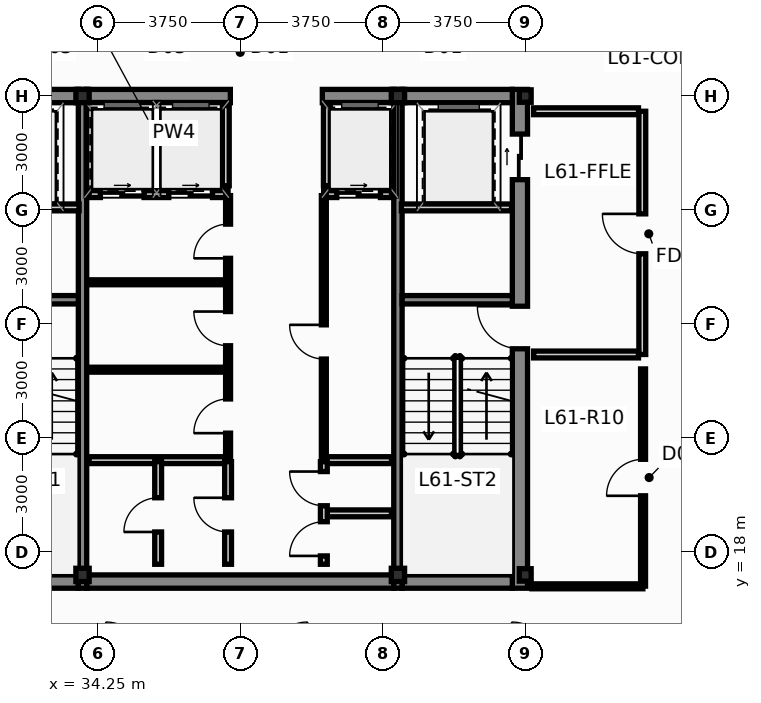
"""IFC4 building model, lengths in metres.
Left out: names, types, materials, properties, quantities, classifications, styles, units other than length and angle.
Written with IfcOpenShell. Run it as: python <this file> out.ifc"""

import sys

from ifc_helpers import new_model, si_unit, direction, frame, frame_2d, origin, origin_2d, place, context, subcontext, project, spatial, rectangle, hollow_rectangle, i_section, extrude, source, transform, mapped, element, fill, save


model = new_model("IFC4")
c1 = context("Model", 3, precision=1e-05, world=origin(), true_north=direction((0.0, 1.0)))
c2 = subcontext(c1, "Body", "Model", "MODEL_VIEW")
j1 = project(units=[si_unit("LENGTHUNIT", "METRE"), si_unit("PLANEANGLEUNIT", "RADIAN")], contexts=[c1])
p1 = place(None, origin())
s1 = spatial("IfcSite", under=j1, at=p1, CompositionType="ELEMENT")
p2 = place(p1, origin())
s2 = spatial("IfcBuilding", under=s1, at=p2, CompositionType="ELEMENT")
p3 = place(p2, frame((0.0, 0.0, 233.5)))
s3 = spatial("IfcBuildingStorey", under=s2, at=p3, CompositionType="ELEMENT", Elevation=233.5)
m1 = source(origin(), c2, "Body", "SweptSolid", [
    extrude(i_section(OverallWidth=0.311, OverallDepth=0.327, WebThickness=0.016, FlangeThickness=0.025, at=origin_2d()), origin(), (0.0, 0.0, 1.0), 3.65),
])
for number, where, z_axis, x_axis in (
    (1, (45.5, 17.4, 0.0), (0.0, 0.0, 1.0), (1.0, 0.0, 0.0)),
    (2, (45.5, 30.0, 0.0), (0.0, 0.0, 1.0), (1.0, 0.0, 0.0)),
):
    element("IfcColumn", number, at=place(p3, frame(where, z_axis=z_axis, x_axis=x_axis)), inside=s3, PredefinedType="COLUMN", context=c2, shape_type="MappedRepresentation", body=[
        mapped(m1, transform((0.0, 0.0, 0.0), scale=1.0)),
    ])
m2 = source(origin(), c2, "Body", "SweptSolid", [
    extrude(hollow_rectangle(XDim=0.35, YDim=0.35, WallThickness=0.016, at=origin_2d()), origin(), (0.0, 0.0, 1.0), 3.65),
])
for number, where, z_axis, x_axis in (
    (3, (33.85, 17.4, 0.0), (0.0, 0.0, 1.0), (1.0, 0.0, 0.0)),
    (4, (42.15, 17.4, 0.0), (0.0, 0.0, 1.0), (1.0, 0.0, 0.0)),
    (5, (33.85, 30.0, 0.0), (0.0, 0.0, 1.0), (1.0, 0.0, 0.0)),
    (6, (42.15, 30.0, 0.0), (0.0, 0.0, 1.0), (1.0, 0.0, 0.0)),
):
    element("IfcColumn", number, at=place(p3, frame(where, z_axis=z_axis, x_axis=x_axis)), inside=s3, PredefinedType="COLUMN", context=c2, shape_type="MappedRepresentation", body=[
        mapped(m2, transform((0.0, 0.0, 0.0), scale=1.0)),
    ])
p4 = place(p3, frame((45.36, 17.05, 0.0), z_axis=(0.0, 0.0, 1.0), x_axis=(0.0, 1.0, 0.0)))
e7 = element("IfcWall", 7, at=p4, inside=s3, PredefinedType="SHEAR", context=c2, shape_type="SweptSolid", body=[
    extrude(rectangle(XDim=13.125, YDim=0.4, at=frame_2d((6.562, 0.0))), origin(), (0.0, 0.0, 1.0), 3.65),
])
p5 = place(p4, frame((6.3, 0.0, 0.0)))
e8 = element("IfcOpeningElement", 8, at=p5, cuts=e7, PredefinedType="OPENING", context=c2, shape_type="SweptSolid", body=[
    extrude(rectangle(XDim=1.12, YDim=2.15, at=frame_2d((0.56, 1.075))), frame((0.0, 0.212, 0.0), z_axis=(0.0, -1.0, 0.0), x_axis=(1.0, 0.0, 0.0)), (0.0, 0.0, 1.0), 0.424),
])
p6 = place(p4, frame((10.75, 0.0, 0.0)))
e9 = element("IfcOpeningElement", 9, at=p6, cuts=e7, PredefinedType="OPENING", context=c2, shape_type="SweptSolid", body=[
    extrude(rectangle(XDim=1.2, YDim=2.2, at=frame_2d((0.6, 1.1))), frame((0.0, 0.212, 0.0), z_axis=(0.0, -1.0, 0.0), x_axis=(1.0, 0.0, 0.0)), (0.0, 0.0, 1.0), 0.424),
])
p7 = place(p3, frame((30.84, 17.225, 0.0), z_axis=(0.0, 0.0, 1.0), x_axis=(1.0, 0.0, 0.0)))
e10 = element("IfcWall", 10, at=p7, inside=s3, PredefinedType="SHEAR", context=c2, shape_type="SweptSolid", body=[
    extrude(rectangle(XDim=2.9, YDim=0.35, at=frame_2d((1.45, 0.0))), origin(), (0.0, 0.0, 1.0), 3.65),
])
p8 = place(p3, frame((33.96, 17.225, 0.0), z_axis=(0.0, 0.0, 1.0), x_axis=(1.0, 0.0, 0.0)))
e11 = element("IfcWall", 11, at=p8, inside=s3, PredefinedType="SHEAR", context=c2, shape_type="SweptSolid", body=[
    extrude(rectangle(XDim=8.08, YDim=0.35, at=frame_2d((4.04, 0.0))), origin(), (0.0, 0.0, 1.0), 3.65),
])
for number, where, z_axis, x_axis in (
    (12, (42.26, 17.225, 0.0), (0.0, 0.0, 1.0), (1.0, 0.0, 0.0)),
    (13, (30.84, 30.0, 0.0), (0.0, 0.0, 1.0), (1.0, 0.0, 0.0)),
):
    element("IfcWall", number, at=place(p3, frame(where, z_axis=z_axis, x_axis=x_axis)), inside=s3, PredefinedType="SHEAR", context=c2, shape_type="SweptSolid", body=[
        extrude(rectangle(XDim=2.9, YDim=0.35, at=frame_2d((1.45, 0.0))), origin(), (0.0, 0.0, 1.0), 3.65),
    ])
p9 = place(p3, frame((33.96, 30.0, 0.0), z_axis=(0.0, 0.0, 1.0), x_axis=(1.0, 0.0, 0.0)))
e14 = element("IfcWall", 14, at=p9, inside=s3, PredefinedType="SHEAR", context=c2, shape_type="SweptSolid", body=[
    extrude(rectangle(XDim=3.78, YDim=0.35, at=frame_2d((1.89, 0.0))), origin(), (0.0, 0.0, 1.0), 3.65),
])
p10 = place(p3, frame((40.16, 30.0, 0.0), z_axis=(0.0, 0.0, 1.0), x_axis=(1.0, 0.0, 0.0)))
e15 = element("IfcWall", 15, at=p10, inside=s3, PredefinedType="SHEAR", context=c2, shape_type="SweptSolid", body=[
    extrude(rectangle(XDim=1.88, YDim=0.35, at=frame_2d((0.94, 0.0))), origin(), (0.0, 0.0, 1.0), 3.65),
])
p11 = place(p3, frame((42.26, 30.0, 0.0), z_axis=(0.0, 0.0, 1.0), x_axis=(1.0, 0.0, 0.0)))
e16 = element("IfcWall", 16, at=p11, inside=s3, PredefinedType="SHEAR", context=c2, shape_type="SweptSolid", body=[
    extrude(rectangle(XDim=2.9, YDim=0.35, at=frame_2d((1.45, 0.0))), origin(), (0.0, 0.0, 1.0), 3.65),
])
for number, where, z_axis, x_axis in (
    (17, (33.85, 17.05, 0.0), (0.0, 0.0, 1.0), (0.0, 1.0, 0.0)),
    (18, (42.15, 17.05, 0.0), (0.0, 0.0, 1.0), (0.0, 1.0, 0.0)),
):
    element("IfcWall", number, at=place(p3, frame(where, z_axis=z_axis, x_axis=x_axis)), inside=s3, PredefinedType="SHEAR", context=c2, shape_type="SweptSolid", body=[
        extrude(rectangle(XDim=13.125, YDim=0.22, at=frame_2d((6.562, 0.0))), origin(), (0.0, 0.0, 1.0), 3.65),
    ])
for number, where, z_axis, x_axis in (
    (19, (30.84, 24.64, 0.0), (0.0, 0.0, 1.0), (1.0, 0.0, 0.0)),
    (20, (42.26, 24.64, 0.0), (0.0, 0.0, 1.0), (1.0, 0.0, 0.0)),
):
    element("IfcWall", number, at=place(p3, frame(where, z_axis=z_axis, x_axis=x_axis)), inside=s3, PredefinedType="SHEAR", context=c2, shape_type="SweptSolid", body=[
        extrude(rectangle(XDim=2.9, YDim=0.22, at=frame_2d((1.45, 0.0))), origin(), (0.0, 0.0, 1.0), 3.65),
    ])
p12 = place(p3, frame((34.02, 27.42, 0.0), z_axis=(0.0, 0.0, 1.0), x_axis=(1.0, 0.0, 0.0)))
e21 = element("IfcWall", 21, at=p12, inside=s3, PredefinedType="PARTITIONING", context=c2, shape_type="SweptSolid", body=[
    extrude(rectangle(XDim=3.66, YDim=0.18, at=frame_2d((1.83, 0.0))), origin(), (0.0, 0.0, 1.0), 3.4),
])
p13 = place(p12, frame((0.3, 0.0, 0.0)))
e22 = element("IfcOpeningElement", 22, at=p13, cuts=e21, PredefinedType="OPENING", context=c2, shape_type="SweptSolid", body=[
    extrude(rectangle(XDim=1.15, YDim=2.2, at=frame_2d((0.575, 1.1))), frame((0.0, 0.102, 0.0), z_axis=(0.0, -1.0, 0.0), x_axis=(1.0, 0.0, 0.0)), (0.0, 0.0, 1.0), 0.204),
])
p14 = place(p12, frame((2.1, 0.0, 0.0)))
e23 = element("IfcOpeningElement", 23, at=p14, cuts=e21, PredefinedType="OPENING", context=c2, shape_type="SweptSolid", body=[
    extrude(rectangle(XDim=1.15, YDim=2.2, at=frame_2d((0.575, 1.1))), frame((0.0, 0.102, 0.0), z_axis=(0.0, -1.0, 0.0), x_axis=(1.0, 0.0, 0.0)), (0.0, 0.0, 1.0), 0.204),
])
p15 = place(p3, frame((40.22, 27.42, 0.0), z_axis=(0.0, 0.0, 1.0), x_axis=(1.0, 0.0, 0.0)))
e24 = element("IfcWall", 24, at=p15, inside=s3, PredefinedType="PARTITIONING", context=c2, shape_type="SweptSolid", body=[
    extrude(rectangle(XDim=1.76, YDim=0.18, at=frame_2d((0.88, 0.0))), origin(), (0.0, 0.0, 1.0), 3.4),
])
p16 = place(p15, frame((0.32, 0.0, 0.0)))
e25 = element("IfcOpeningElement", 25, at=p16, cuts=e24, PredefinedType="OPENING", context=c2, shape_type="SweptSolid", body=[
    extrude(rectangle(XDim=1.15, YDim=2.2, at=frame_2d((0.575, 1.1))), frame((0.0, 0.102, 0.0), z_axis=(0.0, -1.0, 0.0), x_axis=(1.0, 0.0, 0.0)), (0.0, 0.0, 1.0), 0.204),
])
for number, where, z_axis, x_axis in (
    (26, (37.62, 27.64, 0.0), (0.0, 0.0, 1.0), (0.0, 1.0, 0.0)),
    (27, (40.28, 27.64, 0.0), (0.0, 0.0, 1.0), (0.0, 1.0, 0.0)),
):
    element("IfcWall", number, at=place(p3, frame(where, z_axis=z_axis, x_axis=x_axis)), inside=s3, PredefinedType="PARTITIONING", context=c2, shape_type="SweptSolid", body=[
        extrude(rectangle(XDim=2.11, YDim=0.18, at=frame_2d((1.055, 0.0))), origin(), (0.0, 0.0, 1.0), 3.4),
    ])
p17 = place(p3, frame((48.58, 23.2, 0.0), z_axis=(0.0, 0.0, 1.0), x_axis=(0.0, 1.0, 0.0)))
e28 = element("IfcWall", 28, at=p17, inside=s3, PredefinedType="PARTITIONING", context=c2, shape_type="SweptSolid", body=[
    extrude(rectangle(XDim=6.4, YDim=0.18, at=frame_2d((3.2, 0.0))), origin(), (0.0, 0.0, 1.0), 3.085),
])
p18 = place(p17, frame((2.65, 0.0, 0.0)))
e29 = element("IfcOpeningElement", 29, at=p18, cuts=e28, PredefinedType="OPENING", context=c2, shape_type="SweptSolid", body=[
    extrude(rectangle(XDim=1.05, YDim=2.15, at=frame_2d((0.525, 1.075))), frame((0.0, 0.102, 0.0), z_axis=(0.0, -1.0, 0.0), x_axis=(1.0, 0.0, 0.0)), (0.0, 0.0, 1.0), 0.204),
])
p19 = place(p3, frame((45.72, 23.2, 0.0), z_axis=(0.0, 0.0, 1.0), x_axis=(1.0, 0.0, 0.0)))
e30 = element("IfcWall", 30, at=p19, inside=s3, PredefinedType="PARTITIONING", context=c2, shape_type="SweptSolid", body=[
    extrude(rectangle(XDim=2.76, YDim=0.18, at=frame_2d((1.38, 0.0))), origin(), (0.0, 0.0, 1.0), 3.4),
])
p20 = place(p3, frame((45.72, 29.6, 0.0), z_axis=(0.0, 0.0, 1.0), x_axis=(1.0, 0.0, 0.0)))
e31 = element("IfcWall", 31, at=p20, inside=s3, PredefinedType="PARTITIONING", context=c2, shape_type="SweptSolid", body=[
    extrude(rectangle(XDim=2.76, YDim=0.18, at=frame_2d((1.38, 0.0))), origin(), (0.0, 0.0, 1.0), 2.985),
])
for number, where, z_axis, x_axis in (
    (32, (30.86, 27.07, 0.0), (0.0, 0.0, 1.0), (1.0, 0.0, 0.0)),
    (33, (42.24, 27.07, 0.0), (0.0, 0.0, 1.0), (1.0, 0.0, 0.0)),
):
    element("IfcWall", number, at=place(p3, frame(where, z_axis=z_axis, x_axis=x_axis)), inside=s3, PredefinedType="PARTITIONING", context=c2, shape_type="SweptSolid", body=[
        extrude(rectangle(XDim=2.9, YDim=0.18, at=frame_2d((1.45, 0.0))), origin(), (0.0, 0.0, 1.0), 3.4),
    ])
p21 = place(p3, frame((34.02, 20.42, 0.0), z_axis=(0.0, 0.0, 1.0), x_axis=(1.0, 0.0, 0.0)))
e34 = element("IfcWall", 34, at=p21, inside=s3, PredefinedType="PARTITIONING", context=c2, shape_type="SweptSolid", body=[
    extrude(rectangle(XDim=3.64, YDim=0.18, at=frame_2d((1.82, 0.0))), origin(), (0.0, 0.0, 1.0), 3.4),
])
p22 = place(p3, frame((40.22, 20.42, 0.0), z_axis=(0.0, 0.0, 1.0), x_axis=(1.0, 0.0, 0.0)))
e35 = element("IfcWall", 35, at=p22, inside=s3, PredefinedType="PARTITIONING", context=c2, shape_type="SweptSolid", body=[
    extrude(rectangle(XDim=1.76, YDim=0.18, at=frame_2d((0.88, 0.0))), origin(), (0.0, 0.0, 1.0), 3.4),
])
for number, where, z_axis, x_axis in (
    (36, (34.02, 22.8, 0.0), (0.0, 0.0, 1.0), (1.0, 0.0, 0.0)),
    (37, (34.02, 25.1, 0.0), (0.0, 0.0, 1.0), (1.0, 0.0, 0.0)),
):
    element("IfcWall", number, at=place(p3, frame(where, z_axis=z_axis, x_axis=x_axis)), inside=s3, PredefinedType="PARTITIONING", context=c2, shape_type="SweptSolid", body=[
        extrude(rectangle(XDim=3.58, YDim=0.13, at=frame_2d((1.79, 0.0))), origin(), (0.0, 0.0, 1.0), 3.4),
    ])
p23 = place(p3, frame((37.68, 20.48, 0.0), z_axis=(0.0, 0.0, 1.0), x_axis=(0.0, 1.0, 0.0)))
e38 = element("IfcWall", 38, at=p23, inside=s3, PredefinedType="PARTITIONING", context=c2, shape_type="SweptSolid", body=[
    extrude(rectangle(XDim=6.9, YDim=0.13, at=frame_2d((3.45, 0.0))), origin(), (0.0, 0.0, 1.0), 3.4),
])
p24 = place(p23, frame((0.65, 0.0, 0.0)))
e39 = element("IfcOpeningElement", 39, at=p24, cuts=e38, PredefinedType="OPENING", context=c2, shape_type="SweptSolid", body=[
    extrude(rectangle(XDim=0.9, YDim=2.1, at=frame_2d((0.45, 1.05))), frame((0.0, 0.077, 0.0), z_axis=(0.0, -1.0, 0.0), x_axis=(1.0, 0.0, 0.0)), (0.0, 0.0, 1.0), 0.154),
])
p25 = place(p23, frame((2.95, 0.0, 0.0)))
e40 = element("IfcOpeningElement", 40, at=p25, cuts=e38, PredefinedType="OPENING", context=c2, shape_type="SweptSolid", body=[
    extrude(rectangle(XDim=0.9, YDim=2.1, at=frame_2d((0.45, 1.05))), frame((0.0, 0.077, 0.0), z_axis=(0.0, -1.0, 0.0), x_axis=(1.0, 0.0, 0.0)), (0.0, 0.0, 1.0), 0.154),
])
p26 = place(p23, frame((5.25, 0.0, 0.0)))
e41 = element("IfcOpeningElement", 41, at=p26, cuts=e38, PredefinedType="OPENING", context=c2, shape_type="SweptSolid", body=[
    extrude(rectangle(XDim=0.9, YDim=2.1, at=frame_2d((0.45, 1.05))), frame((0.0, 0.077, 0.0), z_axis=(0.0, -1.0, 0.0), x_axis=(1.0, 0.0, 0.0)), (0.0, 0.0, 1.0), 0.154),
])
p27 = place(p3, frame((40.2, 20.48, 0.0), z_axis=(0.0, 0.0, 1.0), x_axis=(0.0, 1.0, 0.0)))
e42 = element("IfcWall", 42, at=p27, inside=s3, PredefinedType="PARTITIONING", context=c2, shape_type="SweptSolid", body=[
    extrude(rectangle(XDim=6.9, YDim=0.13, at=frame_2d((3.45, 0.0))), origin(), (0.0, 0.0, 1.0), 3.4),
])
p28 = place(p27, frame((2.6, 0.0, 0.0)))
e43 = element("IfcOpeningElement", 43, at=p28, cuts=e42, PredefinedType="OPENING", context=c2, shape_type="SweptSolid", body=[
    extrude(rectangle(XDim=0.9, YDim=2.1, at=frame_2d((0.45, 1.05))), frame((0.0, 0.077, 0.0), z_axis=(0.0, -1.0, 0.0), x_axis=(1.0, 0.0, 0.0)), (0.0, 0.0, 1.0), 0.154),
])
p29 = place(p3, frame((35.84, 17.68, 0.0), z_axis=(0.0, 0.0, 1.0), x_axis=(0.0, 1.0, 0.0)))
e44 = element("IfcWall", 44, at=p29, inside=s3, PredefinedType="PARTITIONING", context=c2, shape_type="SweptSolid", body=[
    extrude(rectangle(XDim=2.7, YDim=0.18, at=frame_2d((1.35, 0.0))), origin(), (0.0, 0.0, 1.0), 3.4),
])
p30 = place(p29, frame((0.85, 0.0, 0.0)))
e45 = element("IfcOpeningElement", 45, at=p30, cuts=e44, PredefinedType="OPENING", context=c2, shape_type="SweptSolid", body=[
    extrude(rectangle(XDim=0.9, YDim=2.1, at=frame_2d((0.45, 1.05))), frame((0.0, 0.102, 0.0), z_axis=(0.0, -1.0, 0.0), x_axis=(1.0, 0.0, 0.0)), (0.0, 0.0, 1.0), 0.204),
])
p31 = place(p3, frame((37.68, 17.68, 0.0), z_axis=(0.0, 0.0, 1.0), x_axis=(0.0, 1.0, 0.0)))
e46 = element("IfcWall", 46, at=p31, inside=s3, PredefinedType="PARTITIONING", context=c2, shape_type="SweptSolid", body=[
    extrude(rectangle(XDim=2.7, YDim=0.18, at=frame_2d((1.35, 0.0))), origin(), (0.0, 0.0, 1.0), 3.4),
])
p32 = place(p31, frame((0.85, 0.0, 0.0)))
e47 = element("IfcOpeningElement", 47, at=p32, cuts=e46, PredefinedType="OPENING", context=c2, shape_type="SweptSolid", body=[
    extrude(rectangle(XDim=0.9, YDim=2.1, at=frame_2d((0.45, 1.05))), frame((0.0, 0.102, 0.0), z_axis=(0.0, -1.0, 0.0), x_axis=(1.0, 0.0, 0.0)), (0.0, 0.0, 1.0), 0.204),
])
p33 = place(p3, frame((40.28, 19.02, 0.0), z_axis=(0.0, 0.0, 1.0), x_axis=(1.0, 0.0, 0.0)))
e48 = element("IfcWall", 48, at=p33, inside=s3, PredefinedType="PARTITIONING", context=c2, shape_type="SweptSolid", body=[
    extrude(rectangle(XDim=1.7, YDim=0.18, at=frame_2d((0.85, 0.0))), origin(), (0.0, 0.0, 1.0), 3.4),
])
p34 = place(p3, frame((40.2, 17.68, 0.0), z_axis=(0.0, 0.0, 1.0), x_axis=(0.0, 1.0, 0.0)))
e49 = element("IfcWall", 49, at=p34, inside=s3, PredefinedType="PARTITIONING", context=c2, shape_type="SweptSolid", body=[
    extrude(rectangle(XDim=2.7, YDim=0.18, at=frame_2d((1.35, 0.0))), origin(), (0.0, 0.0, 1.0), 3.4),
])
p35 = place(p34, frame((0.22, 0.0, 0.0)))
e50 = element("IfcOpeningElement", 50, at=p35, cuts=e49, PredefinedType="OPENING", context=c2, shape_type="SweptSolid", body=[
    extrude(rectangle(XDim=0.9, YDim=2.1, at=frame_2d((0.45, 1.05))), frame((0.0, 0.102, 0.0), z_axis=(0.0, -1.0, 0.0), x_axis=(1.0, 0.0, 0.0)), (0.0, 0.0, 1.0), 0.204),
])
p36 = place(p34, frame((1.54, 0.0, 0.0)))
e51 = element("IfcOpeningElement", 51, at=p36, cuts=e49, PredefinedType="OPENING", context=c2, shape_type="SweptSolid", body=[
    extrude(rectangle(XDim=0.9, YDim=2.1, at=frame_2d((0.45, 1.05))), frame((0.0, 0.102, 0.0), z_axis=(0.0, -1.0, 0.0), x_axis=(1.0, 0.0, 0.0)), (0.0, 0.0, 1.0), 0.204),
])
p37 = place(p3, frame((48.6, 17.105, 0.0), z_axis=(0.0, 0.0, 1.0), x_axis=(0.0, 1.0, 0.0)))
e52 = element("IfcWall", 52, at=p37, inside=s3, PredefinedType="PARTITIONING", context=c2, shape_type="SweptSolid", body=[
    extrude(rectangle(XDim=5.715, YDim=0.13, at=frame_2d((2.857, 0.0))), origin(), (0.0, 0.0, 1.0), 3.085),
])
p38 = place(p37, frame((2.377, 0.0, 0.0)))
e53 = element("IfcOpeningElement", 53, at=p38, cuts=e52, PredefinedType="OPENING", context=c2, shape_type="SweptSolid", body=[
    extrude(rectangle(XDim=0.96, YDim=2.15, at=frame_2d((0.48, 1.075))), frame((0.0, 0.077, 0.0), z_axis=(0.0, -1.0, 0.0), x_axis=(1.0, 0.0, 0.0)), (0.0, 0.0, 1.0), 0.154),
])
p39 = place(p3, frame((45.675, 17.1, 0.0), z_axis=(0.0, 0.0, 1.0), x_axis=(1.0, 0.0, 0.0)))
e54 = element("IfcWall", 54, at=p39, inside=s3, PredefinedType="PARTITIONING", context=c2, shape_type="SweptSolid", body=[
    extrude(rectangle(XDim=2.92, YDim=0.13, at=frame_2d((1.46, 0.0))), origin(), (0.0, 0.0, 1.0), 2.985),
])
p40 = place(p5, origin())
e55 = element("IfcDoor", 55, at=p40, inside=s3, OperationType="SINGLE_SWING_RIGHT", PredefinedType="DOOR", context=c2, shape_type="SweptSolid", body=[
    extrude(rectangle(XDim=1.12, YDim=2.15, at=frame_2d((0.56, 1.075))), frame((0.0, 0.025, 0.0), z_axis=(0.0, -1.0, 0.0), x_axis=(1.0, 0.0, 0.0)), (0.0, 0.0, 1.0), 0.05),
])
fill(e8, e55)
p41 = place(p6, origin())
e56 = element("IfcDoor", 56, at=p41, inside=s3, OperationType="SLIDING_TO_RIGHT", PredefinedType="DOOR", context=c2, shape_type="SweptSolid", body=[
    extrude(rectangle(XDim=1.2, YDim=2.2, at=frame_2d((0.6, 1.1))), frame((0.0, 0.025, 0.0), z_axis=(0.0, -1.0, 0.0), x_axis=(1.0, 0.0, 0.0)), (0.0, 0.0, 1.0), 0.05),
])
fill(e9, e56)
p42 = place(p13, origin())
e57 = element("IfcDoor", 57, at=p42, inside=s3, OperationType="SLIDING_TO_RIGHT", PredefinedType="DOOR", context=c2, shape_type="SweptSolid", body=[
    extrude(rectangle(XDim=1.15, YDim=2.2, at=frame_2d((0.575, 1.1))), frame((0.0, 0.025, 0.0), z_axis=(0.0, -1.0, 0.0), x_axis=(1.0, 0.0, 0.0)), (0.0, 0.0, 1.0), 0.05),
])
fill(e22, e57)
p43 = place(p14, origin())
e58 = element("IfcDoor", 58, at=p43, inside=s3, OperationType="SLIDING_TO_LEFT", PredefinedType="DOOR", context=c2, shape_type="SweptSolid", body=[
    extrude(rectangle(XDim=1.15, YDim=2.2, at=frame_2d((0.575, 1.1))), frame((0.0, 0.025, 0.0), z_axis=(0.0, -1.0, 0.0), x_axis=(1.0, 0.0, 0.0)), (0.0, 0.0, 1.0), 0.05),
])
fill(e23, e58)
p44 = place(p16, origin())
e59 = element("IfcDoor", 59, at=p44, inside=s3, OperationType="SLIDING_TO_RIGHT", PredefinedType="DOOR", context=c2, shape_type="SweptSolid", body=[
    extrude(rectangle(XDim=1.15, YDim=2.2, at=frame_2d((0.575, 1.1))), frame((0.0, 0.025, 0.0), z_axis=(0.0, -1.0, 0.0), x_axis=(1.0, 0.0, 0.0)), (0.0, 0.0, 1.0), 0.05),
])
fill(e25, e59)
p45 = place(p18, origin())
e60 = element("IfcDoor", 60, at=p45, inside=s3, OperationType="SINGLE_SWING_RIGHT", PredefinedType="DOOR", context=c2, shape_type="SweptSolid", body=[
    extrude(rectangle(XDim=1.05, YDim=2.15, at=frame_2d((0.525, 1.075))), frame((0.0, 0.025, 0.0), z_axis=(0.0, -1.0, 0.0), x_axis=(1.0, 0.0, 0.0)), (0.0, 0.0, 1.0), 0.05),
])
fill(e29, e60)
p46 = place(p24, origin())
e61 = element("IfcDoor", 61, at=p46, inside=s3, OperationType="SINGLE_SWING_LEFT", PredefinedType="DOOR", context=c2, shape_type="SweptSolid", body=[
    extrude(rectangle(XDim=0.9, YDim=2.1, at=frame_2d((0.45, 1.05))), frame((0.0, 0.025, 0.0), z_axis=(0.0, -1.0, 0.0), x_axis=(1.0, 0.0, 0.0)), (0.0, 0.0, 1.0), 0.05),
])
fill(e39, e61)
p47 = place(p25, origin())
e62 = element("IfcDoor", 62, at=p47, inside=s3, OperationType="SINGLE_SWING_RIGHT", PredefinedType="DOOR", context=c2, shape_type="SweptSolid", body=[
    extrude(rectangle(XDim=0.9, YDim=2.1, at=frame_2d((0.45, 1.05))), frame((0.0, 0.025, 0.0), z_axis=(0.0, -1.0, 0.0), x_axis=(1.0, 0.0, 0.0)), (0.0, 0.0, 1.0), 0.05),
])
fill(e40, e62)
p48 = place(p26, origin())
e63 = element("IfcDoor", 63, at=p48, inside=s3, OperationType="SINGLE_SWING_LEFT", PredefinedType="DOOR", context=c2, shape_type="SweptSolid", body=[
    extrude(rectangle(XDim=0.9, YDim=2.1, at=frame_2d((0.45, 1.05))), frame((0.0, 0.025, 0.0), z_axis=(0.0, -1.0, 0.0), x_axis=(1.0, 0.0, 0.0)), (0.0, 0.0, 1.0), 0.05),
])
fill(e41, e63)
p49 = place(p28, origin())
e64 = element("IfcDoor", 64, at=p49, inside=s3, OperationType="SINGLE_SWING_RIGHT", PredefinedType="DOOR", context=c2, shape_type="SweptSolid", body=[
    extrude(rectangle(XDim=0.9, YDim=2.1, at=frame_2d((0.45, 1.05))), frame((0.0, 0.025, 0.0), z_axis=(0.0, -1.0, 0.0), x_axis=(1.0, 0.0, 0.0)), (0.0, 0.0, 1.0), 0.05),
])
fill(e43, e64)
p50 = place(p30, origin())
e65 = element("IfcDoor", 65, at=p50, inside=s3, OperationType="SINGLE_SWING_LEFT", PredefinedType="DOOR", context=c2, shape_type="SweptSolid", body=[
    extrude(rectangle(XDim=0.9, YDim=2.1, at=frame_2d((0.45, 1.05))), frame((0.0, 0.025, 0.0), z_axis=(0.0, -1.0, 0.0), x_axis=(1.0, 0.0, 0.0)), (0.0, 0.0, 1.0), 0.05),
])
fill(e45, e65)
p51 = place(p32, origin())
e66 = element("IfcDoor", 66, at=p51, inside=s3, OperationType="SINGLE_SWING_RIGHT", PredefinedType="DOOR", context=c2, shape_type="SweptSolid", body=[
    extrude(rectangle(XDim=0.9, YDim=2.1, at=frame_2d((0.45, 1.05))), frame((0.0, 0.025, 0.0), z_axis=(0.0, -1.0, 0.0), x_axis=(1.0, 0.0, 0.0)), (0.0, 0.0, 1.0), 0.05),
])
fill(e47, e66)
p52 = place(p35, origin())
e67 = element("IfcDoor", 67, at=p52, inside=s3, OperationType="SINGLE_SWING_LEFT", PredefinedType="DOOR", context=c2, shape_type="SweptSolid", body=[
    extrude(rectangle(XDim=0.9, YDim=2.1, at=frame_2d((0.45, 1.05))), frame((0.0, 0.025, 0.0), z_axis=(0.0, -1.0, 0.0), x_axis=(1.0, 0.0, 0.0)), (0.0, 0.0, 1.0), 0.05),
])
fill(e50, e67)
p53 = place(p36, origin())
e68 = element("IfcDoor", 68, at=p53, inside=s3, OperationType="SINGLE_SWING_RIGHT", PredefinedType="DOOR", context=c2, shape_type="SweptSolid", body=[
    extrude(rectangle(XDim=0.9, YDim=2.1, at=frame_2d((0.45, 1.05))), frame((0.0, 0.025, 0.0), z_axis=(0.0, -1.0, 0.0), x_axis=(1.0, 0.0, 0.0)), (0.0, 0.0, 1.0), 0.05),
])
fill(e51, e68)
p54 = place(p38, origin())
e69 = element("IfcDoor", 69, at=p54, inside=s3, OperationType="SINGLE_SWING_LEFT", PredefinedType="DOOR", context=c2, shape_type="SweptSolid", body=[
    extrude(rectangle(XDim=0.96, YDim=2.15, at=frame_2d((0.48, 1.075))), frame((0.0, 0.025, 0.0), z_axis=(0.0, -1.0, 0.0), x_axis=(1.0, 0.0, 0.0)), (0.0, 0.0, 1.0), 0.05),
])
fill(e53, e69)
save(model, sys.argv[1])
